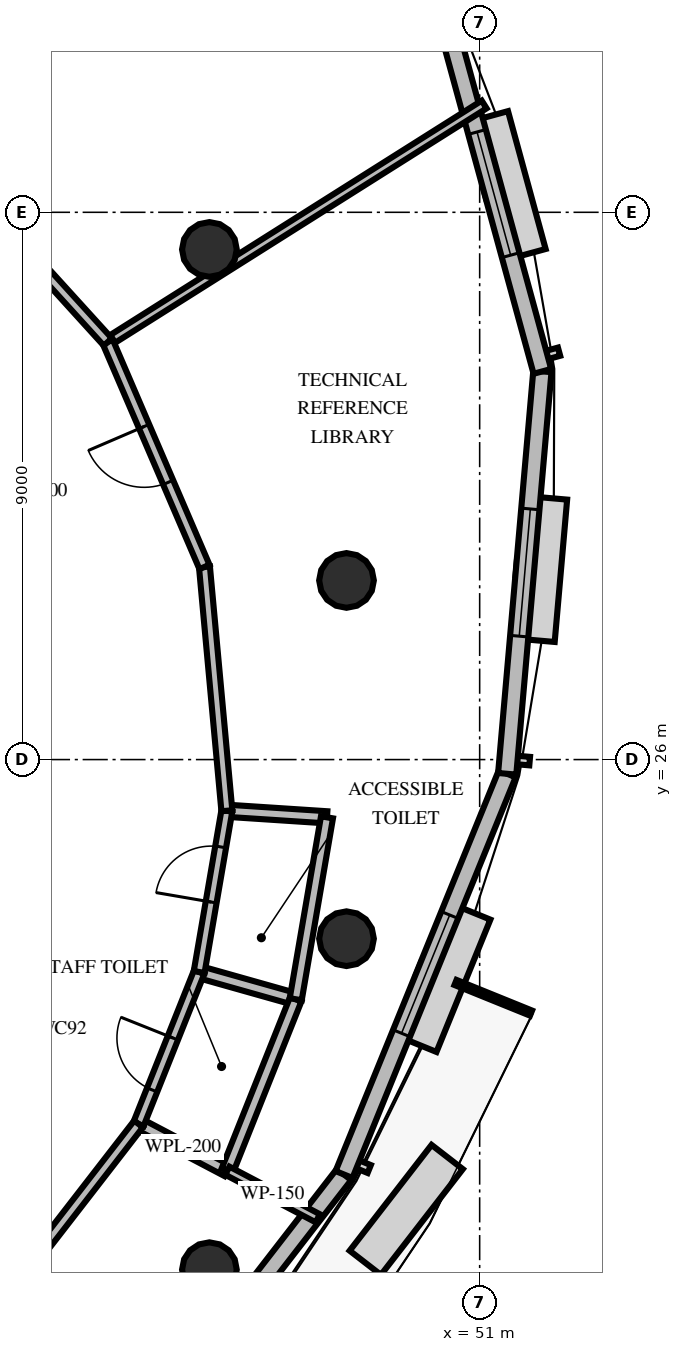
"""IFC4 building model, lengths in metres.
Left out: names, types, materials, properties, quantities, classifications, styles, units other than length and angle.
Written with IfcOpenShell. Run it as: python <this file> out.ifc"""

import sys

from ifc_helpers import new_model, si_unit, direction, frame, frame_2d, origin, origin_2d, place, context, subcontext, project, spatial, rectangle, circle, extrude, element, fill, save


model = new_model("IFC4")
c1 = context("Model", 3, precision=1e-05, world=origin(), true_north=direction((0.0, 1.0)))
c2 = subcontext(c1, "Body", "Model", "MODEL_VIEW")
j1 = project(units=[si_unit("LENGTHUNIT", "METRE"), si_unit("PLANEANGLEUNIT", "RADIAN")], contexts=[c1])
p1 = place(None, origin())
s1 = spatial("IfcSite", under=j1, at=p1, CompositionType="ELEMENT")
p2 = place(p1, origin())
s2 = spatial("IfcBuilding", under=s1, at=p2, CompositionType="ELEMENT")
p3 = place(p2, frame((0.0, 0.0, 248.4)))
s3 = spatial("IfcBuildingStorey", under=s2, at=p3, CompositionType="ELEMENT", Elevation=248.4)
for number, where, z_axis, x_axis in (
    (1, (48.81, 28.946, 0.0), (0.0, 0.0, 1.0), (1.0, 0.0, 0.0)),
    (2, (46.555, 34.389, 0.0), (0.0, 0.0, 1.0), (1.0, 0.0, 0.0)),
    (3, (46.555, 17.611, 0.0), (0.0, 0.0, 1.0), (1.0, 0.0, 0.0)),
    (4, (48.81, 23.054, 0.0), (0.0, 0.0, 1.0), (1.0, 0.0, 0.0)),
):
    element("IfcColumn", number, at=place(p3, frame(where, z_axis=z_axis, x_axis=x_axis)), inside=s3, PredefinedType="COLUMN", context=c2, shape_type="SweptSolid", body=[
        extrude(circle(Radius=0.45, at=origin_2d()), origin(), (0.0, 0.0, 1.0), 3.6),
    ])
p4 = place(p3, frame((44.304, 13.41, 0.0), z_axis=(0.0, 0.0, 1.0), x_axis=(0.612210325416, 0.790694958536, 0.0)))
e5 = element("IfcWall", 5, at=p4, inside=s3, PredefinedType="SOLIDWALL", context=c2, shape_type="SweptSolid", body=[
    extrude(rectangle(XDim=7.293, YDim=0.3, at=frame_2d((3.647, 0.0))), origin(), (0.0, 0.0, 1.0), 2.76),
])
p5 = place(p4, frame((1.07, 0.0, 0.0)))
e6 = element("IfcOpeningElement", 6, at=p5, cuts=e5, PredefinedType="OPENING", context=c2, shape_type="SweptSolid", body=[
    extrude(rectangle(XDim=1.05, YDim=2.15, at=frame_2d((0.525, 1.075))), frame((0.0, 0.16, 0.0), z_axis=(0.0, -1.0, 0.0), x_axis=(1.0, 0.0, 0.0)), (0.0, 0.0, 1.0), 0.32),
])
p6 = place(p3, frame((48.769, 19.177, 0.0), z_axis=(0.0, 0.0, 1.0), x_axis=(0.377169360189, 0.926144305027, 0.0)))
e7 = element("IfcWall", 7, at=p6, inside=s3, PredefinedType="SOLIDWALL", context=c2, shape_type="SweptSolid", body=[
    extrude(rectangle(XDim=7.115, YDim=0.3, at=frame_2d((3.558, 0.0))), origin(), (0.0, 0.0, 1.0), 2.76),
])
p7 = place(p6, frame((2.508, 0.0, 0.8)))
e8 = element("IfcOpeningElement", 8, at=p7, cuts=e7, PredefinedType="OPENING", context=c2, shape_type="SweptSolid", body=[
    extrude(rectangle(XDim=2.1, YDim=1.85, at=frame_2d((1.05, 0.925))), frame((0.0, 0.16, 0.0), z_axis=(0.0, -1.0, 0.0), x_axis=(1.0, 0.0, 0.0)), (0.0, 0.0, 1.0), 0.32),
])
p8 = place(p3, frame((51.453, 25.766, 0.0), z_axis=(0.0, 0.0, 1.0), x_axis=(0.087099022081, 0.99619965888, 0.0)))
e9 = element("IfcWall", 9, at=p8, inside=s3, PredefinedType="SOLIDWALL", context=c2, shape_type="SweptSolid", body=[
    extrude(rectangle(XDim=6.643, YDim=0.3, at=frame_2d((3.322, 0.0))), origin(), (0.0, 0.0, 1.0), 2.76),
])
p9 = place(p8, frame((2.272, 0.0, 0.8)))
e10 = element("IfcOpeningElement", 10, at=p9, cuts=e9, PredefinedType="OPENING", context=c2, shape_type="SweptSolid", body=[
    extrude(rectangle(XDim=2.1, YDim=1.85, at=frame_2d((1.05, 0.925))), frame((0.0, 0.16, 0.0), z_axis=(0.0, -1.0, 0.0), x_axis=(1.0, 0.0, 0.0)), (0.0, 0.0, 1.0), 0.32),
])
p10 = place(p3, frame((52.031, 32.384, 0.0), z_axis=(0.0, 0.0, 1.0), x_axis=(-0.263318465664, 0.964708964217, 0.0)))
e11 = element("IfcWall", 11, at=p10, inside=s3, PredefinedType="SOLIDWALL", context=c2, shape_type="SweptSolid", body=[
    extrude(rectangle(XDim=6.062, YDim=0.3, at=frame_2d((3.031, 0.0))), origin(), (0.0, 0.0, 1.0), 2.76),
])
p11 = place(p10, frame((1.981, 0.0, 0.8)))
e12 = element("IfcOpeningElement", 12, at=p11, cuts=e11, PredefinedType="OPENING", context=c2, shape_type="SweptSolid", body=[
    extrude(rectangle(XDim=2.1, YDim=1.85, at=frame_2d((1.05, 0.925))), frame((0.0, 0.16, 0.0), z_axis=(0.0, -1.0, 0.0), x_axis=(1.0, 0.0, 0.0)), (0.0, 0.0, 1.0), 0.32),
])
p12 = place(p3, frame((45.39, 20.008, 0.0), z_axis=(0.0, 0.0, 1.0), x_axis=(0.884972780046, -0.465642758536, 0.0)))
e13 = element("IfcWall", 13, at=p12, inside=s3, PredefinedType="PLUMBINGWALL", context=c2, shape_type="SweptSolid", body=[
    extrude(rectangle(XDim=1.65, YDim=0.2, at=frame_2d((0.825, 0.0))), origin(), (0.0, 0.0, 1.0), 2.46),
])
p13 = place(p3, frame((46.387, 22.507, 0.0), z_axis=(0.0, 0.0, 1.0), x_axis=(0.962439763699, -0.271495306132, 0.0)))
e14 = element("IfcWall", 14, at=p13, inside=s3, PredefinedType="PLUMBINGWALL", context=c2, shape_type="SweptSolid", body=[
    extrude(rectangle(XDim=1.65, YDim=0.2, at=frame_2d((0.825, 0.0))), origin(), (0.0, 0.0, 1.0), 2.46),
])
p14 = place(p3, frame((46.85, 19.239, 0.0), z_axis=(0.0, 0.0, 1.0), x_axis=(0.370544612269, 0.928814669521, 0.0)))
e15 = element("IfcWall", 15, at=p14, inside=s3, PredefinedType="PLUMBINGWALL", context=c2, shape_type="SweptSolid", body=[
    extrude(rectangle(XDim=3.035, YDim=0.2, at=frame_2d((1.518, 0.0))), origin(), (0.0, 0.0, 1.0), 2.46),
])
p15 = place(p3, frame((45.39, 20.008, 0.0), z_axis=(0.0, 0.0, 1.0), x_axis=(0.370498732277, 0.928832971734, 0.0)))
e16 = element("IfcWall", 16, at=p15, inside=s3, PredefinedType="PARTITIONING", context=c2, shape_type="SweptSolid", body=[
    extrude(rectangle(XDim=2.69, YDim=0.18, at=frame_2d((1.345, 0.0))), origin(), (0.0, 0.0, 1.0), 2.46),
])
p16 = place(p15, frame((0.603, 0.0, 0.0)))
e17 = element("IfcOpeningElement", 17, at=p16, cuts=e16, PredefinedType="OPENING", context=c2, shape_type="SweptSolid", body=[
    extrude(rectangle(XDim=0.92, YDim=2.1, at=frame_2d((0.46, 1.05))), frame((0.0, 0.1, 0.0), z_axis=(0.0, -1.0, 0.0), x_axis=(1.0, 0.0, 0.0)), (0.0, 0.0, 1.0), 0.2),
])
p17 = place(p3, frame((46.842, 25.158, 0.0), z_axis=(0.0, 0.0, 1.0), x_axis=(0.997859798446, -0.065389774783, 0.0)))
e18 = element("IfcWall", 18, at=p17, inside=s3, PredefinedType="PLUMBINGWALL", context=c2, shape_type="SweptSolid", body=[
    extrude(rectangle(XDim=1.65, YDim=0.2, at=frame_2d((0.825, 0.0))), origin(), (0.0, 0.0, 1.0), 2.46),
])
p18 = place(p3, frame((47.975, 22.059, 0.0), z_axis=(0.0, 0.0, 1.0), x_axis=(0.169379009467, 0.985550988611, 0.0)))
e19 = element("IfcWall", 19, at=p18, inside=s3, PredefinedType="PLUMBINGWALL", context=c2, shape_type="SweptSolid", body=[
    extrude(rectangle(XDim=3.036, YDim=0.2, at=frame_2d((1.518, 0.0))), origin(), (0.0, 0.0, 1.0), 2.46),
])
p19 = place(p3, frame((46.387, 22.507, 0.0), z_axis=(0.0, 0.0, 1.0), x_axis=(0.169326487934, 0.985560013639, 0.0)))
e20 = element("IfcWall", 20, at=p19, inside=s3, PredefinedType="PARTITIONING", context=c2, shape_type="SweptSolid", body=[
    extrude(rectangle(XDim=2.69, YDim=0.18, at=frame_2d((1.345, 0.0))), origin(), (0.0, 0.0, 1.0), 2.46),
])
p20 = place(p19, frame((1.167, 0.0, 0.0)))
e21 = element("IfcOpeningElement", 21, at=p20, cuts=e20, PredefinedType="OPENING", context=c2, shape_type="SweptSolid", body=[
    extrude(rectangle(XDim=0.92, YDim=2.1, at=frame_2d((0.46, 1.05))), frame((0.0, 0.1, 0.0), z_axis=(0.0, -1.0, 0.0), x_axis=(1.0, 0.0, 0.0)), (0.0, 0.0, 1.0), 0.2),
])
p21 = place(p3, frame((46.85, 19.239, 0.0), z_axis=(0.0, 0.0, 1.0), x_axis=(0.884968627089, -0.465650651313, 0.0)))
e22 = element("IfcWall", 22, at=p21, inside=s3, PredefinedType="PARTITIONING", context=c2, shape_type="SweptSolid", body=[
    extrude(rectangle(XDim=1.681, YDim=0.15, at=frame_2d((0.84, 0.0))), origin(), (0.0, 0.0, 1.0), 2.46),
])
p22 = place(p3, frame((44.885, 32.868, 0.0), z_axis=(0.0, 0.0, 1.0), x_axis=(0.845732184642, 0.533607601015, 0.0)))
e23 = element("IfcWall", 23, at=p22, inside=s3, PredefinedType="PARTITIONING", context=c2, shape_type="SweptSolid", body=[
    extrude(rectangle(XDim=7.318, YDim=0.15, at=frame_2d((3.659, 0.0))), origin(), (0.0, 0.0, 1.0), 2.46),
])
p23 = place(p3, frame((46.842, 25.158, 0.0), z_axis=(0.0, 0.0, 1.0), x_axis=(-0.091432259976, 0.995811298307, 0.0)))
e24 = element("IfcWall", 24, at=p23, inside=s3, PredefinedType="PARTITIONING", context=c2, shape_type="SweptSolid", body=[
    extrude(rectangle(XDim=4.027, YDim=0.18, at=frame_2d((2.013, 0.0))), origin(), (0.0, 0.0, 1.0), 2.46),
])
p24 = place(p3, frame((46.474, 29.168, 0.0), z_axis=(0.0, 0.0, 1.0), x_axis=(-0.394760633313, 0.91878400203, 0.0)))
e25 = element("IfcWall", 25, at=p24, inside=s3, PredefinedType="PARTITIONING", context=c2, shape_type="SweptSolid", body=[
    extrude(rectangle(XDim=4.027, YDim=0.18, at=frame_2d((2.013, 0.0))), origin(), (0.0, 0.0, 1.0), 2.46),
])
p25 = place(p24, frame((1.513, 0.0, 0.0)))
e26 = element("IfcOpeningElement", 26, at=p25, cuts=e25, PredefinedType="OPENING", context=c2, shape_type="SweptSolid", body=[
    extrude(rectangle(XDim=1.0, YDim=2.15, at=frame_2d((0.5, 1.075))), frame((0.0, 0.1, 0.0), z_axis=(0.0, -1.0, 0.0), x_axis=(1.0, 0.0, 0.0)), (0.0, 0.0, 1.0), 0.2),
])
p26 = place(p3, frame((44.885, 32.868, 0.0), z_axis=(0.0, 0.0, 1.0), x_axis=(-0.672373687718, 0.740211877819, 0.0)))
e27 = element("IfcWall", 27, at=p26, inside=s3, PredefinedType="PARTITIONING", context=c2, shape_type="SweptSolid", body=[
    extrude(rectangle(XDim=4.47, YDim=0.18, at=frame_2d((2.235, 0.0))), origin(), (0.0, 0.0, 1.0), 2.46),
])
p27 = place(p26, frame((2.527, 0.0, 0.0)))
e28 = element("IfcOpeningElement", 28, at=p27, cuts=e27, PredefinedType="OPENING", context=c2, shape_type="SweptSolid", body=[
    extrude(rectangle(XDim=1.0, YDim=2.15, at=frame_2d((0.5, 1.075))), frame((0.0, 0.1, 0.0), z_axis=(0.0, -1.0, 0.0), x_axis=(1.0, 0.0, 0.0)), (0.0, 0.0, 1.0), 0.2),
])
p28 = place(p3, frame((42.653, 16.473, 0.0), z_axis=(0.0, 0.0, 1.0), x_axis=(0.612233781192, 0.790676796907, 0.0)))
e29 = element("IfcWall", 29, at=p28, inside=s3, PredefinedType="PARTITIONING", context=c2, shape_type="SweptSolid", body=[
    extrude(rectangle(XDim=4.47, YDim=0.18, at=frame_2d((2.235, 0.0))), origin(), (0.0, 0.0, 1.0), 2.46),
])
p29 = place(p7, origin())
e30 = element("IfcWindow", 30, at=p29, inside=s3, PartitioningType="SINGLE_PANEL", PredefinedType="WINDOW", context=c2, shape_type="SweptSolid", body=[
    extrude(rectangle(XDim=2.1, YDim=1.85, at=frame_2d((1.05, 0.925))), frame((0.0, 0.03, 0.0), z_axis=(0.0, -1.0, 0.0), x_axis=(1.0, 0.0, 0.0)), (0.0, 0.0, 1.0), 0.06),
])
fill(e8, e30)
p30 = place(p9, origin())
e31 = element("IfcWindow", 31, at=p30, inside=s3, PartitioningType="SINGLE_PANEL", PredefinedType="WINDOW", context=c2, shape_type="SweptSolid", body=[
    extrude(rectangle(XDim=2.1, YDim=1.85, at=frame_2d((1.05, 0.925))), frame((0.0, 0.03, 0.0), z_axis=(0.0, -1.0, 0.0), x_axis=(1.0, 0.0, 0.0)), (0.0, 0.0, 1.0), 0.06),
])
fill(e10, e31)
p31 = place(p11, origin())
e32 = element("IfcWindow", 32, at=p31, inside=s3, PartitioningType="SINGLE_PANEL", PredefinedType="WINDOW", context=c2, shape_type="SweptSolid", body=[
    extrude(rectangle(XDim=2.1, YDim=1.85, at=frame_2d((1.05, 0.925))), frame((0.0, 0.03, 0.0), z_axis=(0.0, -1.0, 0.0), x_axis=(1.0, 0.0, 0.0)), (0.0, 0.0, 1.0), 0.06),
])
fill(e12, e32)
p32 = place(p16, origin())
e33 = element("IfcDoor", 33, at=p32, inside=s3, OperationType="SINGLE_SWING_RIGHT", PredefinedType="DOOR", context=c2, shape_type="SweptSolid", body=[
    extrude(rectangle(XDim=0.92, YDim=2.1, at=frame_2d((0.46, 1.05))), frame((0.0, 0.025, 0.0), z_axis=(0.0, -1.0, 0.0), x_axis=(1.0, 0.0, 0.0)), (0.0, 0.0, 1.0), 0.05),
])
fill(e17, e33)
p33 = place(p20, origin())
e34 = element("IfcDoor", 34, at=p33, inside=s3, OperationType="SINGLE_SWING_LEFT", PredefinedType="DOOR", context=c2, shape_type="SweptSolid", body=[
    extrude(rectangle(XDim=0.92, YDim=2.1, at=frame_2d((0.46, 1.05))), frame((0.0, 0.025, 0.0), z_axis=(0.0, -1.0, 0.0), x_axis=(1.0, 0.0, 0.0)), (0.0, 0.0, 1.0), 0.05),
])
fill(e21, e34)
p34 = place(p25, origin())
e35 = element("IfcDoor", 35, at=p34, inside=s3, OperationType="SINGLE_SWING_RIGHT", PredefinedType="DOOR", context=c2, shape_type="SweptSolid", body=[
    extrude(rectangle(XDim=1.0, YDim=2.15, at=frame_2d((0.5, 1.075))), frame((0.0, 0.025, 0.0), z_axis=(0.0, -1.0, 0.0), x_axis=(1.0, 0.0, 0.0)), (0.0, 0.0, 1.0), 0.05),
])
fill(e26, e35)
save(model, sys.argv[1])
